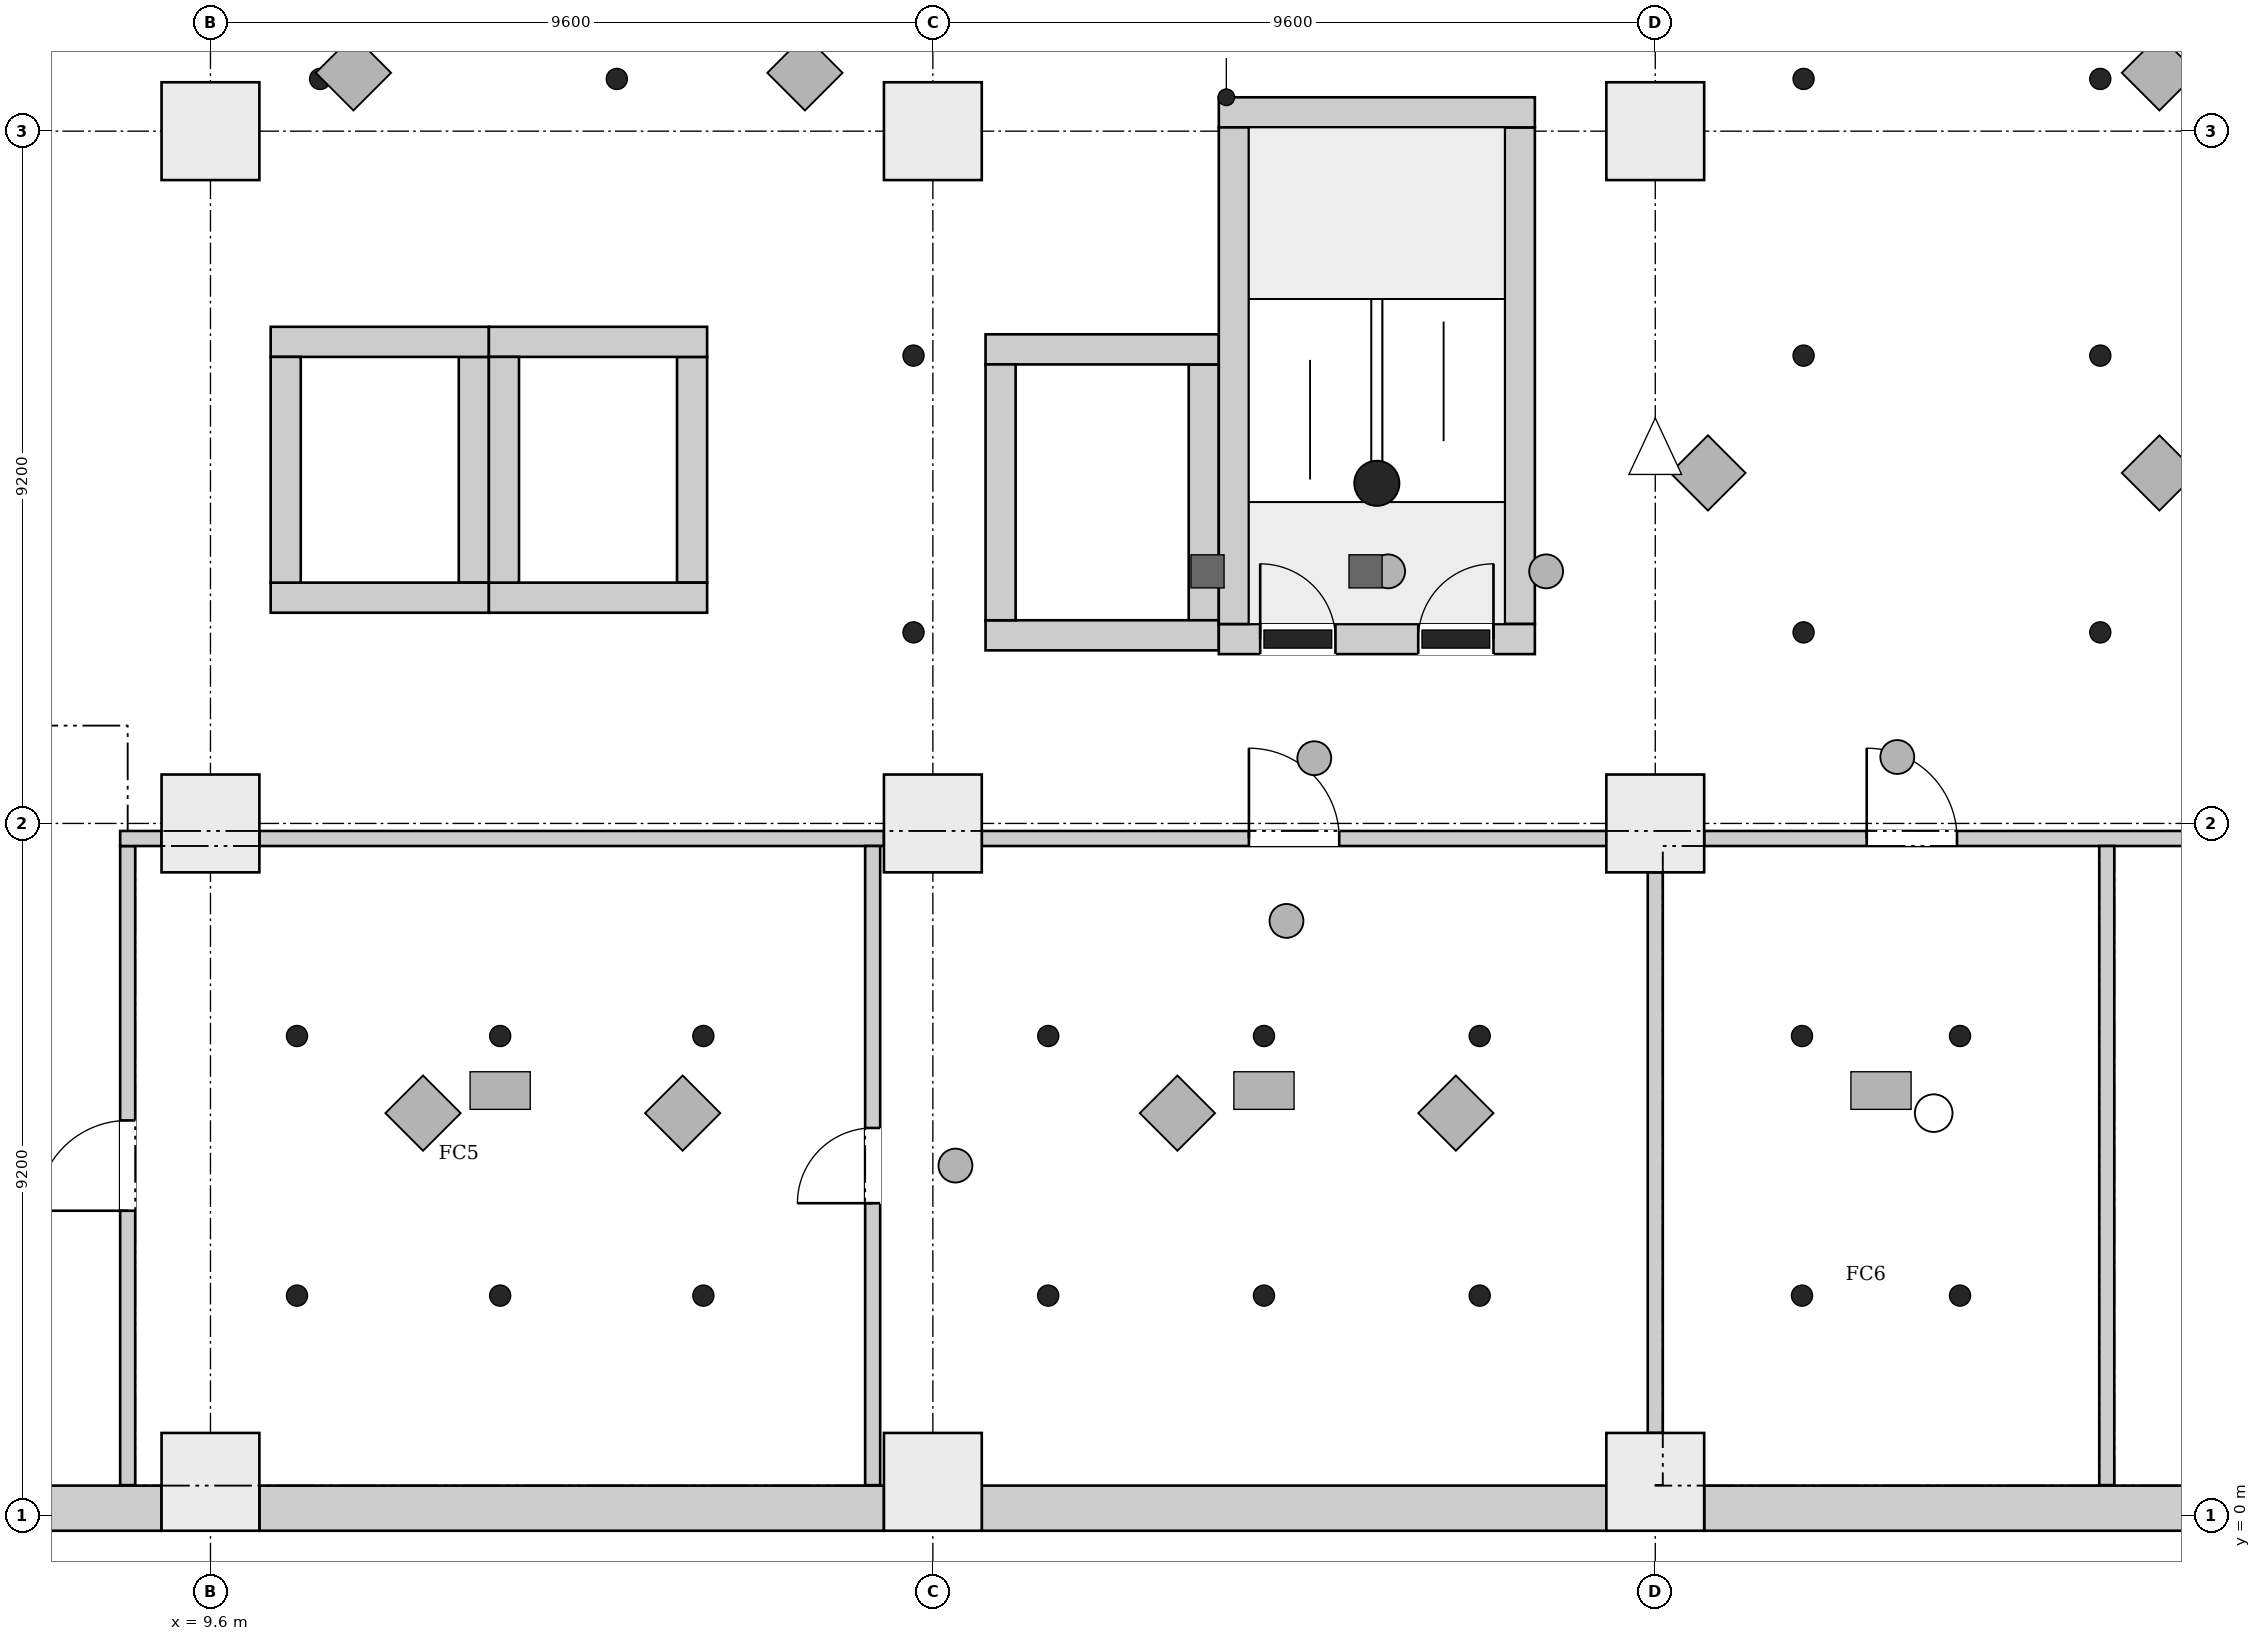
"""IFC4 building model, lengths in metres.
Left out: names, types, materials, properties, quantities, classifications, styles, units other than length and angle.
Written with IfcOpenShell. Run it as: python <this file> out.ifc"""

import sys

from ifc_helpers import new_model, si_unit, direction, frame, frame_2d, origin, origin_2d, place, context, subcontext, project, spatial, rectangle, extrude, element, fill, save


model = new_model("IFC4")
c1 = context("Model", 3, precision=1e-05, world=origin(), true_north=direction((0.0, 1.0)))
c2 = subcontext(c1, "Body", "Model", "MODEL_VIEW")
j1 = project(units=[si_unit("LENGTHUNIT", "METRE"), si_unit("PLANEANGLEUNIT", "RADIAN")], contexts=[c1])
p1 = place(None, origin())
s1 = spatial("IfcSite", under=j1, at=p1, CompositionType="ELEMENT")
p2 = place(p1, origin())
s2 = spatial("IfcBuilding", under=s1, at=p2, CompositionType="ELEMENT")
p3 = place(p2, frame((0.0, 0.0, -5.5)))
s3 = spatial("IfcBuildingStorey", under=s2, at=p3, CompositionType="ELEMENT", Elevation=-5.5)
p4 = place(p3, frame((0.4, 0.1, 0.0), z_axis=(0.0, 0.0, 1.0), x_axis=(1.0, 0.0, 0.0)))
e1 = element("IfcWall", 1, at=p4, inside=s3, PredefinedType="SOLIDWALL", context=c2, shape_type="SweptSolid", body=[
    extrude(rectangle(XDim=8.55, YDim=0.6, at=frame_2d((4.275, 0.0))), origin(), (0.0, 0.0, 1.0), 5.5),
])
p5 = place(p3, frame((10.25, 0.1, 0.0), z_axis=(0.0, 0.0, 1.0), x_axis=(1.0, 0.0, 0.0)))
e2 = element("IfcWall", 2, at=p5, inside=s3, PredefinedType="SOLIDWALL", context=c2, shape_type="SweptSolid", body=[
    extrude(rectangle(XDim=8.3, YDim=0.6, at=frame_2d((4.15, 0.0))), origin(), (0.0, 0.0, 1.0), 5.5),
])
p6 = place(p3, frame((19.85, 0.1, 0.0), z_axis=(0.0, 0.0, 1.0), x_axis=(1.0, 0.0, 0.0)))
e3 = element("IfcWall", 3, at=p6, inside=s3, PredefinedType="SOLIDWALL", context=c2, shape_type="SweptSolid", body=[
    extrude(rectangle(XDim=8.3, YDim=0.6, at=frame_2d((4.15, 0.0))), origin(), (0.0, 0.0, 1.0), 5.5),
])
p7 = place(p3, frame((29.45, 0.1, 0.0), z_axis=(0.0, 0.0, 1.0), x_axis=(1.0, 0.0, 0.0)))
e4 = element("IfcWall", 4, at=p7, inside=s3, PredefinedType="SOLIDWALL", context=c2, shape_type="SweptSolid", body=[
    extrude(rectangle(XDim=8.3, YDim=0.6, at=frame_2d((4.15, 0.0))), origin(), (0.0, 0.0, 1.0), 5.5),
])
p8 = place(p3, frame((23.0, 11.65, 0.0), z_axis=(0.0, 0.0, 1.0), x_axis=(1.0, 0.0, 0.0)))
e5 = element("IfcWall", 5, at=p8, inside=s3, PredefinedType="SHEAR", context=c2, shape_type="SweptSolid", body=[
    extrude(rectangle(XDim=4.2, YDim=0.4, at=frame_2d((2.1, 0.0))), origin(), (0.0, 0.0, 1.0), 5.5),
])
p9 = place(p8, frame((0.55, 0.0, 0.0)))
e6 = element("IfcOpeningElement", 6, at=p9, cuts=e5, PredefinedType="OPENING", context=c2, shape_type="SweptSolid", body=[
    extrude(rectangle(XDim=1.0, YDim=2.1, at=frame_2d((0.5, 1.05))), frame((0.0, 0.21, 0.0), z_axis=(0.0, -1.0, 0.0), x_axis=(1.0, 0.0, 0.0)), (0.0, 0.0, 1.0), 0.42),
])
p10 = place(p8, frame((2.65, 0.0, 0.0)))
e7 = element("IfcOpeningElement", 7, at=p10, cuts=e5, PredefinedType="OPENING", context=c2, shape_type="SweptSolid", body=[
    extrude(rectangle(XDim=1.0, YDim=2.1, at=frame_2d((0.5, 1.05))), frame((0.0, 0.21, 0.0), z_axis=(0.0, -1.0, 0.0), x_axis=(1.0, 0.0, 0.0)), (0.0, 0.0, 1.0), 0.42),
])
p11 = place(p3, frame((23.0, 18.65, 0.0), z_axis=(0.0, 0.0, 1.0), x_axis=(1.0, 0.0, 0.0)))
e8 = element("IfcWall", 8, at=p11, inside=s3, PredefinedType="SHEAR", context=c2, shape_type="SweptSolid", body=[
    extrude(rectangle(XDim=4.2, YDim=0.4, at=frame_2d((2.1, 0.0))), origin(), (0.0, 0.0, 1.0), 5.5),
])
for number, where, z_axis, x_axis in (
    (9, (23.2, 11.85, 0.0), (0.0, 0.0, 1.0), (0.0, 1.0, 0.0)),
    (10, (27.0, 11.85, 0.0), (0.0, 0.0, 1.0), (0.0, 1.0, 0.0)),
):
    element("IfcWall", number, at=place(p3, frame(where, z_axis=z_axis, x_axis=x_axis)), inside=s3, PredefinedType="SHEAR", context=c2, shape_type="SweptSolid", body=[
        extrude(rectangle(XDim=6.6, YDim=0.4, at=frame_2d((3.3, 0.0))), origin(), (0.0, 0.0, 1.0), 5.5),
    ])
for number, where, z_axis, x_axis in (
    (11, (10.4, 12.2, 0.0), (0.0, 0.0, 1.0), (1.0, 0.0, 0.0)),
    (12, (10.4, 15.6, 0.0), (0.0, 0.0, 1.0), (1.0, 0.0, 0.0)),
):
    element("IfcWall", number, at=place(p3, frame(where, z_axis=z_axis, x_axis=x_axis)), inside=s3, PredefinedType="SHEAR", context=c2, shape_type="SweptSolid", body=[
        extrude(rectangle(XDim=2.9, YDim=0.4, at=frame_2d((1.45, 0.0))), origin(), (0.0, 0.0, 1.0), 5.5),
    ])
for number, where, z_axis, x_axis in (
    (13, (10.6, 12.4, 0.0), (0.0, 0.0, 1.0), (0.0, 1.0, 0.0)),
    (14, (13.1, 12.4, 0.0), (0.0, 0.0, 1.0), (0.0, 1.0, 0.0)),
):
    element("IfcWall", number, at=place(p3, frame(where, z_axis=z_axis, x_axis=x_axis)), inside=s3, PredefinedType="SHEAR", context=c2, shape_type="SweptSolid", body=[
        extrude(rectangle(XDim=3.0, YDim=0.4, at=frame_2d((1.5, 0.0))), origin(), (0.0, 0.0, 1.0), 5.5),
    ])
for number, where, z_axis, x_axis in (
    (15, (13.3, 12.2, 0.0), (0.0, 0.0, 1.0), (1.0, 0.0, 0.0)),
    (16, (13.3, 15.6, 0.0), (0.0, 0.0, 1.0), (1.0, 0.0, 0.0)),
):
    element("IfcWall", number, at=place(p3, frame(where, z_axis=z_axis, x_axis=x_axis)), inside=s3, PredefinedType="SHEAR", context=c2, shape_type="SweptSolid", body=[
        extrude(rectangle(XDim=2.9, YDim=0.4, at=frame_2d((1.45, 0.0))), origin(), (0.0, 0.0, 1.0), 5.5),
    ])
for number, where, z_axis, x_axis in (
    (17, (13.5, 12.4, 0.0), (0.0, 0.0, 1.0), (0.0, 1.0, 0.0)),
    (18, (16.0, 12.4, 0.0), (0.0, 0.0, 1.0), (0.0, 1.0, 0.0)),
):
    element("IfcWall", number, at=place(p3, frame(where, z_axis=z_axis, x_axis=x_axis)), inside=s3, PredefinedType="SHEAR", context=c2, shape_type="SweptSolid", body=[
        extrude(rectangle(XDim=3.0, YDim=0.4, at=frame_2d((1.5, 0.0))), origin(), (0.0, 0.0, 1.0), 5.5),
    ])
for number, where, z_axis, x_axis in (
    (19, (19.9, 11.7, 0.0), (0.0, 0.0, 1.0), (1.0, 0.0, 0.0)),
    (20, (19.9, 15.5, 0.0), (0.0, 0.0, 1.0), (1.0, 0.0, 0.0)),
):
    element("IfcWall", number, at=place(p3, frame(where, z_axis=z_axis, x_axis=x_axis)), inside=s3, PredefinedType="SHEAR", context=c2, shape_type="SweptSolid", body=[
        extrude(rectangle(XDim=3.1, YDim=0.4, at=frame_2d((1.55, 0.0))), origin(), (0.0, 0.0, 1.0), 5.5),
    ])
for number, where, z_axis, x_axis in (
    (21, (20.1, 11.9, 0.0), (0.0, 0.0, 1.0), (0.0, 1.0, 0.0)),
    (22, (22.8, 11.9, 0.0), (0.0, 0.0, 1.0), (0.0, 1.0, 0.0)),
):
    element("IfcWall", number, at=place(p3, frame(where, z_axis=z_axis, x_axis=x_axis)), inside=s3, PredefinedType="SHEAR", context=c2, shape_type="SweptSolid", body=[
        extrude(rectangle(XDim=3.4, YDim=0.4, at=frame_2d((1.7, 0.0))), origin(), (0.0, 0.0, 1.0), 5.5),
    ])
for number, where, z_axis, x_axis in (
    (23, (9.6, 0.45, 0.0), (0.0, 0.0, 1.0), (1.0, 0.0, 0.0)),
    (24, (19.2, 0.45, 0.0), (0.0, 0.0, 1.0), (1.0, 0.0, 0.0)),
    (25, (28.8, 0.45, 0.0), (0.0, 0.0, 1.0), (1.0, 0.0, 0.0)),
    (26, (9.6, 9.2, 0.0), (0.0, 0.0, 1.0), (1.0, 0.0, 0.0)),
    (27, (19.2, 9.2, 0.0), (0.0, 0.0, 1.0), (1.0, 0.0, 0.0)),
    (28, (28.8, 9.2, 0.0), (0.0, 0.0, 1.0), (1.0, 0.0, 0.0)),
    (29, (9.6, 18.4, 0.0), (0.0, 0.0, 1.0), (1.0, 0.0, 0.0)),
    (30, (19.2, 18.4, 0.0), (0.0, 0.0, 1.0), (1.0, 0.0, 0.0)),
    (31, (28.8, 18.4, 0.0), (0.0, 0.0, 1.0), (1.0, 0.0, 0.0)),
):
    element("IfcColumn", number, at=place(p3, frame(where, z_axis=z_axis, x_axis=x_axis)), inside=s3, PredefinedType="COLUMN", context=c2, shape_type="SweptSolid", body=[
        extrude(rectangle(XDim=1.3, YDim=1.3, at=origin_2d()), origin(), (0.0, 0.0, 1.0), 5.5),
    ])
p12 = place(p3, frame((8.5, 0.406, 0.0), z_axis=(0.0, 0.0, 1.0), x_axis=(0.0, 1.0, 0.0)))
e32 = element("IfcWall", 32, at=p12, inside=s3, PredefinedType="PARTITIONING", context=c2, shape_type="SweptSolid", body=[
    extrude(rectangle(XDim=8.494, YDim=0.2, at=frame_2d((4.247, 0.0))), origin(), (0.0, 0.0, 1.0), 5.15),
])
p13 = place(p12, frame((3.647, 0.0, 0.0)))
e33 = element("IfcOpeningElement", 33, at=p13, cuts=e32, PredefinedType="OPENING", context=c2, shape_type="SweptSolid", body=[
    extrude(rectangle(XDim=1.2, YDim=2.1, at=frame_2d((0.6, 1.05))), frame((0.0, 0.11, 0.0), z_axis=(0.0, -1.0, 0.0), x_axis=(1.0, 0.0, 0.0)), (0.0, 0.0, 1.0), 0.22),
])
p14 = place(p3, frame((8.4, 9.0, 0.0), z_axis=(0.0, 0.0, 1.0), x_axis=(1.0, 0.0, 0.0)))
e34 = element("IfcWall", 34, at=p14, inside=s3, PredefinedType="PARTITIONING", context=c2, shape_type="SweptSolid", body=[
    extrude(rectangle(XDim=0.55, YDim=0.2, at=frame_2d((0.275, 0.0))), origin(), (0.0, 0.0, 1.0), 5.15),
])
p15 = place(p3, frame((10.25, 9.0, 0.0), z_axis=(0.0, 0.0, 1.0), x_axis=(1.0, 0.0, 0.0)))
e35 = element("IfcWall", 35, at=p15, inside=s3, PredefinedType="PARTITIONING", context=c2, shape_type="SweptSolid", body=[
    extrude(rectangle(XDim=8.3, YDim=0.2, at=frame_2d((4.15, 0.0))), origin(), (0.0, 0.0, 1.0), 5.15),
])
p16 = place(p3, frame((18.4, 0.406, 0.0), z_axis=(0.0, 0.0, 1.0), x_axis=(0.0, 1.0, 0.0)))
e36 = element("IfcWall", 36, at=p16, inside=s3, PredefinedType="PARTITIONING", context=c2, shape_type="SweptSolid", body=[
    extrude(rectangle(XDim=8.494, YDim=0.2, at=frame_2d((4.247, 0.0))), origin(), (0.0, 0.0, 1.0), 5.15),
])
p17 = place(p16, frame((3.747, 0.0, 0.0)))
e37 = element("IfcOpeningElement", 37, at=p17, cuts=e36, PredefinedType="OPENING", context=c2, shape_type="SweptSolid", body=[
    extrude(rectangle(XDim=1.0, YDim=2.1, at=frame_2d((0.5, 1.05))), frame((0.0, 0.11, 0.0), z_axis=(0.0, -1.0, 0.0), x_axis=(1.0, 0.0, 0.0)), (0.0, 0.0, 1.0), 0.22),
])
p18 = place(p3, frame((19.85, 9.0, 0.0), z_axis=(0.0, 0.0, 1.0), x_axis=(1.0, 0.0, 0.0)))
e38 = element("IfcWall", 38, at=p18, inside=s3, PredefinedType="PARTITIONING", context=c2, shape_type="SweptSolid", body=[
    extrude(rectangle(XDim=8.3, YDim=0.2, at=frame_2d((4.15, 0.0))), origin(), (0.0, 0.0, 1.0), 5.15),
])
p19 = place(p18, frame((3.55, 0.0, 0.0)))
e39 = element("IfcOpeningElement", 39, at=p19, cuts=e38, PredefinedType="OPENING", context=c2, shape_type="SweptSolid", body=[
    extrude(rectangle(XDim=1.2, YDim=2.1, at=frame_2d((0.6, 1.05))), frame((0.0, 0.11, 0.0), z_axis=(0.0, -1.0, 0.0), x_axis=(1.0, 0.0, 0.0)), (0.0, 0.0, 1.0), 0.22),
])
p20 = place(p3, frame((28.8, 1.1, 0.0), z_axis=(0.0, 0.0, 1.0), x_axis=(0.0, 1.0, 0.0)))
e40 = element("IfcWall", 40, at=p20, inside=s3, PredefinedType="PARTITIONING", context=c2, shape_type="SweptSolid", body=[
    extrude(rectangle(XDim=7.45, YDim=0.2, at=frame_2d((3.725, 0.0))), origin(), (0.0, 0.0, 1.0), 5.15),
])
p21 = place(p3, frame((29.45, 9.0, 0.0), z_axis=(0.0, 0.0, 1.0), x_axis=(1.0, 0.0, 0.0)))
e41 = element("IfcWall", 41, at=p21, inside=s3, PredefinedType="PARTITIONING", context=c2, shape_type="SweptSolid", body=[
    extrude(rectangle(XDim=8.3, YDim=0.2, at=frame_2d((4.15, 0.0))), origin(), (0.0, 0.0, 1.0), 5.15),
])
p22 = place(p21, frame((2.16, 0.0, 0.0)))
e42 = element("IfcOpeningElement", 42, at=p22, cuts=e41, PredefinedType="OPENING", context=c2, shape_type="SweptSolid", body=[
    extrude(rectangle(XDim=1.2, YDim=2.1, at=frame_2d((0.6, 1.05))), frame((0.0, 0.11, 0.0), z_axis=(0.0, -1.0, 0.0), x_axis=(1.0, 0.0, 0.0)), (0.0, 0.0, 1.0), 0.22),
])
p23 = place(p3, frame((34.8, 0.406, 0.0), z_axis=(0.0, 0.0, 1.0), x_axis=(0.0, 1.0, 0.0)))
e43 = element("IfcWall", 43, at=p23, inside=s3, PredefinedType="PARTITIONING", context=c2, shape_type="SweptSolid", body=[
    extrude(rectangle(XDim=8.494, YDim=0.2, at=frame_2d((4.247, 0.0))), origin(), (0.0, 0.0, 1.0), 5.15),
])
p24 = place(p9, origin())
e44 = element("IfcDoor", 44, at=p24, inside=s3, OperationType="SINGLE_SWING_RIGHT", PredefinedType="DOOR", context=c2, shape_type="SweptSolid", body=[
    extrude(rectangle(XDim=1.0, YDim=2.1, at=frame_2d((0.5, 1.05))), frame((0.0, 0.025, 0.0), z_axis=(0.0, -1.0, 0.0), x_axis=(1.0, 0.0, 0.0)), (0.0, 0.0, 1.0), 0.05),
])
fill(e6, e44)
p25 = place(p10, origin())
e45 = element("IfcDoor", 45, at=p25, inside=s3, OperationType="SINGLE_SWING_LEFT", PredefinedType="DOOR", context=c2, shape_type="SweptSolid", body=[
    extrude(rectangle(XDim=1.0, YDim=2.1, at=frame_2d((0.5, 1.05))), frame((0.0, 0.025, 0.0), z_axis=(0.0, -1.0, 0.0), x_axis=(1.0, 0.0, 0.0)), (0.0, 0.0, 1.0), 0.05),
])
fill(e7, e45)
p26 = place(p13, origin())
e46 = element("IfcDoor", 46, at=p26, inside=s3, OperationType="SINGLE_SWING_LEFT", PredefinedType="DOOR", context=c2, shape_type="SweptSolid", body=[
    extrude(rectangle(XDim=1.2, YDim=2.1, at=frame_2d((0.6, 1.05))), frame((0.0, 0.025, 0.0), z_axis=(0.0, -1.0, 0.0), x_axis=(1.0, 0.0, 0.0)), (0.0, 0.0, 1.0), 0.05),
])
fill(e33, e46)
p27 = place(p19, origin())
e47 = element("IfcDoor", 47, at=p27, inside=s3, OperationType="SINGLE_SWING_LEFT", PredefinedType="DOOR", context=c2, shape_type="SweptSolid", body=[
    extrude(rectangle(XDim=1.2, YDim=2.1, at=frame_2d((0.6, 1.05))), frame((0.0, 0.025, 0.0), z_axis=(0.0, -1.0, 0.0), x_axis=(1.0, 0.0, 0.0)), (0.0, 0.0, 1.0), 0.05),
])
fill(e39, e47)
p28 = place(p22, origin())
e48 = element("IfcDoor", 48, at=p28, inside=s3, OperationType="SINGLE_SWING_RIGHT", PredefinedType="DOOR", context=c2, shape_type="SweptSolid", body=[
    extrude(rectangle(XDim=1.2, YDim=2.1, at=frame_2d((0.6, 1.05))), frame((0.0, 0.025, 0.0), z_axis=(0.0, -1.0, 0.0), x_axis=(1.0, 0.0, 0.0)), (0.0, 0.0, 1.0), 0.05),
])
fill(e42, e48)
p29 = place(p17, origin())
e49 = element("IfcDoor", 49, at=p29, inside=s3, OperationType="SINGLE_SWING_LEFT", PredefinedType="DOOR", context=c2, shape_type="SweptSolid", body=[
    extrude(rectangle(XDim=1.0, YDim=2.1, at=frame_2d((0.5, 1.05))), frame((0.0, 0.025, 0.0), z_axis=(0.0, -1.0, 0.0), x_axis=(1.0, 0.0, 0.0)), (0.0, 0.0, 1.0), 0.05),
])
fill(e37, e49)
save(model, sys.argv[1])
